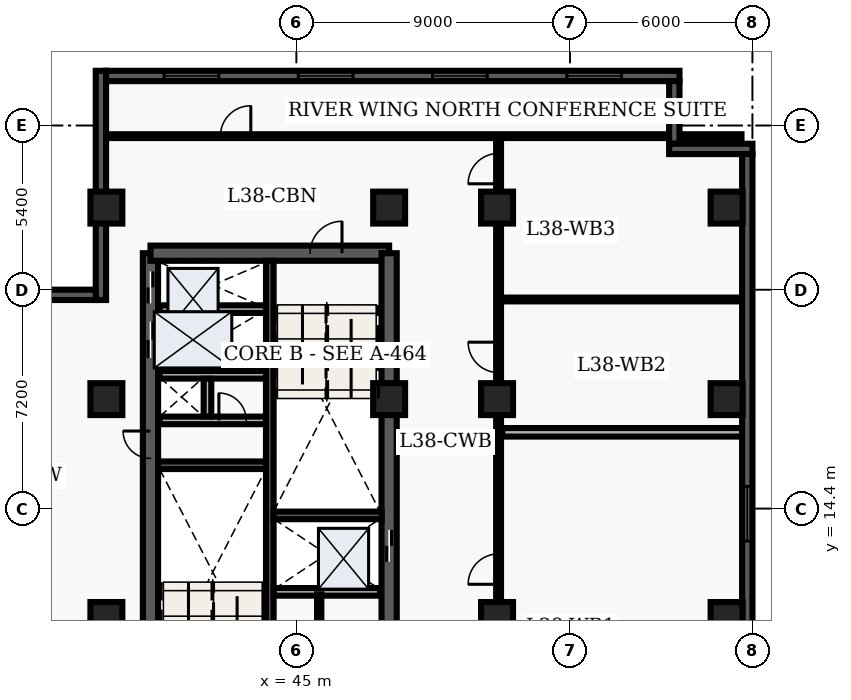
"""IFC4 building model, lengths in metres.
Left out: names, types, materials, properties, quantities, classifications, styles, units other than length and angle.
Written with IfcOpenShell. Run it as: python <this file> out.ifc"""

import sys

from ifc_helpers import new_model, entity, si_unit, converted_unit, direction, frame, origin_with_axes, origin_2d_with_axis, place, context, subcontext, project, spatial, polyline, rectangle, outline, extrude, element, fill, save


model = new_model("IFC4")
c1 = context("Model", 3, precision=1e-05, world=origin_with_axes(), true_north=direction((0.0, 1.0)))
c2 = subcontext(c1, "Body", "Model", "MODEL_VIEW")
j1 = project(units=[si_unit("LENGTHUNIT", "METRE"), converted_unit("PLANEANGLEUNIT", "DEGREE", entity("IfcPlaneAngleMeasure", 0.017), si_unit("PLANEANGLEUNIT", "RADIAN"), dimensions=[0, 0, 0, 0, 0, 0, 0])], contexts=[c1])
p1 = place(None, origin_with_axes())
s1 = spatial("IfcSite", under=j1, at=p1, CompositionType="ELEMENT")
p2 = place(p1, origin_with_axes())
s2 = spatial("IfcBuilding", under=s1, at=p2, CompositionType="ELEMENT")
p3 = place(p2, frame((0.0, 0.0, 156.3), z_axis=(0.0, 0.0, 1.0), x_axis=(1.0, 0.0, 0.0)))
s3 = spatial("IfcBuildingStorey", under=s2, at=p3, CompositionType="ELEMENT", Elevation=156.3)
p4 = place(p3, frame((40.2, 7.2, 0.0), z_axis=(0.0, 0.0, 1.0), x_axis=(0.0, 1.0, 0.0)))
e1 = element("IfcWall", 1, at=p4, inside=s3, PredefinedType="SHEAR", context=c2, shape_type="SweptSolid", body=[
    extrude(outline(polyline([(0.0, -0.25), (15.6, -0.25), (15.6, 0.25), (0.0, 0.25), (0.0, -0.25)])), origin_with_axes(), (0.0, 0.0, 1.0), 3.66),
])
p5 = place(p4, frame((14.475, 0.0, 0.0), z_axis=(0.0, 0.0, 1.0), x_axis=(1.0, 0.0, 0.0)))
e2 = element("IfcOpeningElement", 2, at=p5, cuts=e1, PredefinedType="OPENING", context=c2, shape_type="SweptSolid", body=[
    extrude(rectangle(XDim=1.05, YDim=0.52, at=origin_2d_with_axis()), origin_with_axes(), (0.0, 0.0, 1.0), 2.15),
])
p6 = place(p4, frame((12.75, 0.0, 0.0), z_axis=(0.0, 0.0, 1.0), x_axis=(1.0, 0.0, 0.0)))
e3 = element("IfcOpeningElement", 3, at=p6, cuts=e1, PredefinedType="OPENING", context=c2, shape_type="SweptSolid", body=[
    extrude(rectangle(XDim=1.2, YDim=0.52, at=origin_2d_with_axis()), origin_with_axes(), (0.0, 0.0, 1.0), 2.15),
])
p7 = place(p4, frame((9.3, 0.0, 0.0), z_axis=(0.0, 0.0, 1.0), x_axis=(1.0, 0.0, 0.0)))
e4 = element("IfcOpeningElement", 4, at=p7, cuts=e1, PredefinedType="OPENING", context=c2, shape_type="SweptSolid", body=[
    extrude(rectangle(XDim=0.9, YDim=0.52, at=origin_2d_with_axis()), origin_with_axes(), (0.0, 0.0, 1.0), 2.15),
])
p8 = place(p3, frame((40.2, 22.8, 0.0), z_axis=(0.0, 0.0, 1.0), x_axis=(1.0, 0.0, 0.0)))
e5 = element("IfcWall", 5, at=p8, inside=s3, PredefinedType="SHEAR", context=c2, shape_type="SweptSolid", body=[
    extrude(outline(polyline([(0.0, -0.25), (7.85, -0.25), (7.85, 0.25), (0.0, 0.25), (0.0, -0.25)])), origin_with_axes(), (0.0, 0.0, 1.0), 3.66),
])
p9 = place(p8, frame((5.775, 0.0, 0.0), z_axis=(0.0, 0.0, 1.0), x_axis=(1.0, 0.0, 0.0)))
e6 = element("IfcOpeningElement", 6, at=p9, cuts=e5, PredefinedType="OPENING", context=c2, shape_type="SweptSolid", body=[
    extrude(rectangle(XDim=1.05, YDim=0.52, at=origin_2d_with_axis()), origin_with_axes(), (0.0, 0.0, 1.0), 2.15),
])
p10 = place(p3, frame((48.05, 7.2, 0.0), z_axis=(0.0, 0.0, 1.0), x_axis=(0.0, 1.0, 0.0)))
e7 = element("IfcWall", 7, at=p10, inside=s3, PredefinedType="SHEAR", context=c2, shape_type="SweptSolid", body=[
    extrude(outline(polyline([(0.0, -0.25), (15.6, -0.25), (15.6, 0.25), (0.0, 0.25), (0.0, -0.25)])), origin_with_axes(), (0.0, 0.0, 1.0), 3.66),
])
p11 = place(p10, frame((5.975, 0.0, 0.0), z_axis=(0.0, 0.0, 1.0), x_axis=(1.0, 0.0, 0.0)))
e8 = element("IfcOpeningElement", 8, at=p11, cuts=e7, PredefinedType="OPENING", context=c2, shape_type="SweptSolid", body=[
    extrude(rectangle(XDim=1.05, YDim=0.52, at=origin_2d_with_axis()), origin_with_axes(), (0.0, 0.0, 1.0), 2.15),
])
p12 = place(p10, frame((2.725, 0.0, 0.0), z_axis=(0.0, 0.0, 1.0), x_axis=(1.0, 0.0, 0.0)))
e9 = element("IfcOpeningElement", 9, at=p12, cuts=e7, PredefinedType="OPENING", context=c2, shape_type="SweptSolid", body=[
    extrude(rectangle(XDim=0.95, YDim=0.52, at=origin_2d_with_axis()), origin_with_axes(), (0.0, 0.0, 1.0), 2.15),
])
p13 = place(p3, frame((44.125, 7.45, 0.0), z_axis=(0.0, 0.0, 1.0), x_axis=(0.0, 1.0, 0.0)))
e10 = element("IfcWall", 10, at=p13, inside=s3, PredefinedType="SHEAR", context=c2, shape_type="SweptSolid", body=[
    extrude(outline(polyline([(0.0, -0.125), (15.1, -0.125), (15.1, 0.125), (0.0, 0.125), (0.0, -0.125)])), origin_with_axes(), (0.0, 0.0, 1.0), 3.66),
])
for number, where, z_axis, x_axis in (
    (11, (40.45, 15.825, 0.0), (0.0, 0.0, 1.0), (1.0, 0.0, 0.0)),
    (12, (44.25, 14.175, 0.0), (0.0, 0.0, 1.0), (1.0, 0.0, 0.0)),
):
    element("IfcWall", number, at=place(p3, frame(where, z_axis=z_axis, x_axis=x_axis)), inside=s3, PredefinedType="SHEAR", context=c2, shape_type="SweptSolid", body=[
        extrude(outline(polyline([(0.0, -0.125), (3.55, -0.125), (3.55, 0.125), (0.0, 0.125), (0.0, -0.125)])), origin_with_axes(), (0.0, 0.0, 1.0), 3.66),
    ])
p14 = place(p3, frame((40.5, 17.3, 0.0), z_axis=(0.0, 0.0, 1.0), x_axis=(1.0, 0.0, 0.0)))
e13 = element("IfcWall", 13, at=p14, inside=s3, PredefinedType="SOLIDWALL", context=c2, shape_type="SweptSolid", body=[
    extrude(outline(polyline([(0.0, -0.125), (3.5, -0.125), (3.5, 0.125), (0.0, 0.125), (0.0, -0.125)])), origin_with_axes(), (0.0, 0.0, 1.0), 2.7),
])
p15 = place(p14, frame((2.4, 0.0, 0.0), z_axis=(0.0, 0.0, 1.0), x_axis=(1.0, 0.0, 0.0)))
e14 = element("IfcOpeningElement", 14, at=p15, cuts=e13, PredefinedType="OPENING", context=c2, shape_type="SweptSolid", body=[
    extrude(rectangle(XDim=0.9, YDim=0.27, at=origin_2d_with_axis()), origin_with_axes(), (0.0, 0.0, 1.0), 2.15),
])
p16 = place(p3, frame((40.5, 18.8, 0.0), z_axis=(0.0, 0.0, 1.0), x_axis=(1.0, 0.0, 0.0)))
e15 = element("IfcWall", 15, at=p16, inside=s3, PredefinedType="SOLIDWALL", context=c2, shape_type="SweptSolid", body=[
    extrude(outline(polyline([(0.0, -0.125), (3.5, -0.125), (3.5, 0.125), (0.0, 0.125), (0.0, -0.125)])), origin_with_axes(), (0.0, 0.0, 1.0), 2.7),
])
p17 = place(p3, frame((42.075, 17.43, 0.0), z_axis=(0.0, 0.0, 1.0), x_axis=(0.0, 1.0, 0.0)))
e16 = element("IfcWall", 16, at=p17, inside=s3, PredefinedType="SOLIDWALL", context=c2, shape_type="SweptSolid", body=[
    extrude(outline(polyline([(0.0, -0.125), (1.24, -0.125), (1.24, 0.125), (0.0, 0.125), (0.0, -0.125)])), origin_with_axes(), (0.0, 0.0, 1.0), 2.7),
])
for number, where, z_axis, x_axis in (
    (17, (38.75, 10.8, 0.0), (0.0, 0.0, 1.0), (1.0, 0.0, 0.0)),
    (18, (38.75, 18.0, 0.0), (0.0, 0.0, 1.0), (1.0, 0.0, 0.0)),
    (19, (38.75, 24.3, 0.0), (0.0, 0.0, 1.0), (1.0, 0.0, 0.0)),
    (20, (48.05, 18.0, 0.0), (0.0, 0.0, 1.0), (1.0, 0.0, 0.0)),
    (21, (48.05, 24.3, 0.0), (0.0, 0.0, 1.0), (1.0, 0.0, 0.0)),
    (22, (51.6, 10.8, 0.0), (0.0, 0.0, 1.0), (1.0, 0.0, 0.0)),
    (23, (51.6, 18.0, 0.0), (0.0, 0.0, 1.0), (1.0, 0.0, 0.0)),
    (24, (51.6, 24.3, 0.0), (0.0, 0.0, 1.0), (1.0, 0.0, 0.0)),
    (25, (59.15, 10.8, 0.0), (0.0, 0.0, 1.0), (1.0, 0.0, 0.0)),
    (26, (59.15, 18.0, 0.0), (0.0, 0.0, 1.0), (1.0, 0.0, 0.0)),
    (27, (59.15, 24.3, 0.0), (0.0, 0.0, 1.0), (1.0, 0.0, 0.0)),
):
    element("IfcColumn", number, at=place(p3, frame(where, z_axis=z_axis, x_axis=x_axis)), inside=s3, PredefinedType="COLUMN", context=c2, shape_type="SweptSolid", body=[
        extrude(rectangle(XDim=1.05, YDim=1.05, at=origin_2d_with_axis()), origin_with_axes(), (0.0, 0.0, 1.0), 3.9),
    ])
for number, where, z_axis, x_axis in (
    (28, (40.5, 20.96, 0.0), (0.0, 0.0, 1.0), (1.0, 0.0, 0.0)),
    (29, (44.25, 11.66, 0.0), (0.0, 0.0, 1.0), (1.0, 0.0, 0.0)),
):
    element("IfcWall", number, at=place(p3, frame(where, z_axis=z_axis, x_axis=x_axis)), inside=s3, PredefinedType="SOLIDWALL", context=c2, shape_type="SweptSolid", body=[
        extrude(outline(polyline([(0.0, -0.125), (3.5, -0.125), (3.5, 0.125), (0.0, 0.125), (0.0, -0.125)])), origin_with_axes(), (0.0, 0.0, 1.0), 2.7),
    ])
p18 = place(p3, frame((45.75, 7.5, 0.0), z_axis=(0.0, 0.0, 1.0), x_axis=(0.0, 1.0, 0.0)))
e30 = element("IfcWall", 30, at=p18, inside=s3, PredefinedType="PARTITIONING", context=c2, shape_type="SweptSolid", body=[
    extrude(outline(polyline([(0.0, -0.07), (4.08, -0.07), (4.08, 0.07), (0.0, 0.07), (0.0, -0.07)])), origin_with_axes(), (0.0, 0.0, 1.0), 2.7),
])
p19 = place(p18, frame((2.0, 0.0, 0.0), z_axis=(0.0, 0.0, 1.0), x_axis=(1.0, 0.0, 0.0)))
e31 = element("IfcOpeningElement", 31, at=p19, cuts=e30, PredefinedType="OPENING", context=c2, shape_type="SweptSolid", body=[
    extrude(rectangle(XDim=0.9, YDim=0.16, at=origin_2d_with_axis()), origin_with_axes(), (0.0, 0.0, 1.0), 2.15),
])
p20 = place(p3, frame((51.65, 7.85, 0.0), z_axis=(0.0, 0.0, 1.0), x_axis=(0.0, 1.0, 0.0)))
e32 = element("IfcWall", 32, at=p20, inside=s3, PredefinedType="PARTITIONING", context=c2, shape_type="SweptSolid", body=[
    extrude(outline(polyline([(0.0, -0.08), (18.8, -0.08), (18.8, 0.08), (0.0, 0.08), (0.0, -0.08)])), origin_with_axes(), (0.0, 0.0, 1.0), 2.7),
])
p21 = place(p20, frame((4.559, 0.0, 0.0), z_axis=(0.0, 0.0, 1.0), x_axis=(1.0, 0.0, 0.0)))
e33 = element("IfcOpeningElement", 33, at=p21, cuts=e32, PredefinedType="OPENING", context=c2, shape_type="SweptSolid", body=[
    extrude(rectangle(XDim=1.0, YDim=0.18, at=origin_2d_with_axis()), origin_with_axes(), (0.0, 0.0, 1.0), 2.15),
])
p22 = place(p20, frame((11.523, 0.0, 0.0), z_axis=(0.0, 0.0, 1.0), x_axis=(1.0, 0.0, 0.0)))
e34 = element("IfcOpeningElement", 34, at=p22, cuts=e32, PredefinedType="OPENING", context=c2, shape_type="SweptSolid", body=[
    extrude(rectangle(XDim=1.0, YDim=0.18, at=origin_2d_with_axis()), origin_with_axes(), (0.0, 0.0, 1.0), 2.15),
])
p23 = place(p20, frame((17.733, 0.0, 0.0), z_axis=(0.0, 0.0, 1.0), x_axis=(1.0, 0.0, 0.0)))
e35 = element("IfcOpeningElement", 35, at=p23, cuts=e32, PredefinedType="OPENING", context=c2, shape_type="SweptSolid", body=[
    extrude(rectangle(XDim=1.0, YDim=0.18, at=origin_2d_with_axis()), origin_with_axes(), (0.0, 0.0, 1.0), 2.15),
])
p24 = place(p3, frame((38.735, 26.65, 0.0), z_axis=(0.0, 0.0, 1.0), x_axis=(1.0, 0.0, 0.0)))
e36 = element("IfcWall", 36, at=p24, inside=s3, PredefinedType="PARTITIONING", context=c2, shape_type="SweptSolid", body=[
    extrude(outline(polyline([(0.0, -0.062), (20.905, -0.062), (20.905, 0.062), (0.0, 0.062), (0.0, -0.062)])), origin_with_axes(), (0.0, 0.0, 1.0), 2.7),
])
p25 = place(p24, frame((4.265, 0.0, 0.0), z_axis=(0.0, 0.0, 1.0), x_axis=(1.0, 0.0, 0.0)))
e37 = element("IfcOpeningElement", 37, at=p25, cuts=e36, PredefinedType="OPENING", context=c2, shape_type="SweptSolid", body=[
    extrude(rectangle(XDim=1.0, YDim=0.145, at=origin_2d_with_axis()), origin_with_axes(), (0.0, 0.0, 1.0), 2.15),
])
p26 = place(p3, frame((51.77, 16.908, 0.0), z_axis=(0.0, 0.0, 1.0), x_axis=(1.0, 0.0, 0.0)))
e38 = element("IfcWall", 38, at=p26, inside=s3, PredefinedType="PARTITIONING", context=c2, shape_type="SweptSolid", body=[
    extrude(outline(polyline([(0.0, -0.14), (7.895, -0.14), (7.895, 0.14), (0.0, 0.14), (0.0, -0.14)])), origin_with_axes(), (0.0, 0.0, 1.0), 2.7),
])
p27 = place(p3, frame((51.77, 21.277, 0.0), z_axis=(0.0, 0.0, 1.0), x_axis=(1.0, 0.0, 0.0)))
e39 = element("IfcWall", 39, at=p27, inside=s3, PredefinedType="PARTITIONING", context=c2, shape_type="SweptSolid", body=[
    extrude(outline(polyline([(0.0, -0.062), (7.895, -0.062), (7.895, 0.062), (0.0, 0.062), (0.0, -0.062)])), origin_with_axes(), (0.0, 0.0, 1.0), 2.7),
])
p28 = place(p3, frame((38.57, 21.26, 0.0), z_axis=(0.0, 0.0, 1.0), x_axis=(0.0, 1.0, 0.0)))
e40 = element("IfcWall", 40, at=p28, inside=s3, PredefinedType="SOLIDWALL", context=c2, shape_type="SweptSolid", body=[
    extrude(outline(polyline([(0.0, -0.17), (7.54, -0.17), (7.54, 0.17), (0.0, 0.17), (0.0, -0.17)])), origin_with_axes(), (0.0, 0.0, 1.0), 3.66),
])
p29 = place(p3, frame((38.74, 28.63, 0.0), z_axis=(0.0, 0.0, 1.0), x_axis=(1.0, 0.0, 0.0)))
e41 = element("IfcWall", 41, at=p29, inside=s3, PredefinedType="SOLIDWALL", context=c2, shape_type="SweptSolid", body=[
    extrude(outline(polyline([(0.0, -0.17), (18.86, -0.17), (18.86, 0.17), (0.0, 0.17), (0.0, -0.17)])), origin_with_axes(), (0.0, 0.0, 1.0), 3.66),
])
p30 = place(p29, frame((2.808, 0.0, 0.45), z_axis=(0.0, 0.0, 1.0), x_axis=(1.0, 0.0, 0.0)))
e42 = element("IfcOpeningElement", 42, at=p30, cuts=e41, PredefinedType="OPENING", context=c2, shape_type="SweptSolid", body=[
    extrude(rectangle(XDim=1.8, YDim=0.36, at=origin_2d_with_axis()), origin_with_axes(), (0.0, 0.0, 1.0), 2.1),
])
p31 = place(p29, frame((7.222, 0.0, 0.45), z_axis=(0.0, 0.0, 1.0), x_axis=(1.0, 0.0, 0.0)))
e43 = element("IfcOpeningElement", 43, at=p31, cuts=e41, PredefinedType="OPENING", context=c2, shape_type="SweptSolid", body=[
    extrude(rectangle(XDim=1.8, YDim=0.36, at=origin_2d_with_axis()), origin_with_axes(), (0.0, 0.0, 1.0), 2.1),
])
p32 = place(p29, frame((11.637, 0.0, 0.45), z_axis=(0.0, 0.0, 1.0), x_axis=(1.0, 0.0, 0.0)))
e44 = element("IfcOpeningElement", 44, at=p32, cuts=e41, PredefinedType="OPENING", context=c2, shape_type="SweptSolid", body=[
    extrude(rectangle(XDim=1.8, YDim=0.36, at=origin_2d_with_axis()), origin_with_axes(), (0.0, 0.0, 1.0), 2.1),
])
p33 = place(p29, frame((16.053, 0.0, 0.45), z_axis=(0.0, 0.0, 1.0), x_axis=(1.0, 0.0, 0.0)))
e45 = element("IfcOpeningElement", 45, at=p33, cuts=e41, PredefinedType="OPENING", context=c2, shape_type="SweptSolid", body=[
    extrude(rectangle(XDim=1.8, YDim=0.36, at=origin_2d_with_axis()), origin_with_axes(), (0.0, 0.0, 1.0), 2.1),
])
p34 = place(p3, frame((57.43, 28.46, 0.0), z_axis=(0.0, 0.0, 1.0), x_axis=(0.0, -1.0, 0.0)))
e46 = element("IfcWall", 46, at=p34, inside=s3, PredefinedType="SOLIDWALL", context=c2, shape_type="SweptSolid", body=[
    extrude(outline(polyline([(0.0, -0.17), (2.06, -0.17), (2.06, 0.17), (0.0, 0.17), (0.0, -0.17)])), origin_with_axes(), (0.0, 0.0, 1.0), 3.66),
])
p35 = place(p3, frame((57.26, 26.23, 0.0), z_axis=(0.0, 0.0, 1.0), x_axis=(1.0, 0.0, 0.0)))
e47 = element("IfcWall", 47, at=p35, inside=s3, PredefinedType="SOLIDWALL", context=c2, shape_type="SweptSolid", body=[
    extrude(outline(polyline([(0.0, -0.17), (2.74, -0.17), (2.74, 0.17), (0.0, 0.17), (0.0, -0.17)])), origin_with_axes(), (0.0, 0.0, 1.0), 3.66),
])
p36 = place(p3, frame((59.83, 26.06, 0.0), z_axis=(0.0, 0.0, 1.0), x_axis=(0.0, -1.0, 0.0)))
e48 = element("IfcWall", 48, at=p36, inside=s3, PredefinedType="SOLIDWALL", context=c2, shape_type="SweptSolid", body=[
    extrude(outline(polyline([(0.0, -0.17), (23.66, -0.17), (23.66, 0.17), (0.0, 0.17), (0.0, -0.17)])), origin_with_axes(), (0.0, 0.0, 1.0), 3.66),
])
p37 = place(p36, frame((11.83, 0.0, 0.45), z_axis=(0.0, 0.0, 1.0), x_axis=(1.0, 0.0, 0.0)))
e49 = element("IfcOpeningElement", 49, at=p37, cuts=e48, PredefinedType="OPENING", context=c2, shape_type="SweptSolid", body=[
    extrude(rectangle(XDim=1.8, YDim=0.36, at=origin_2d_with_axis()), origin_with_axes(), (0.0, 0.0, 1.0), 2.1),
])
p38 = place(p36, frame((20.364, 0.0, 0.45), z_axis=(0.0, 0.0, 1.0), x_axis=(1.0, 0.0, 0.0)))
e50 = element("IfcOpeningElement", 50, at=p38, cuts=e48, PredefinedType="OPENING", context=c2, shape_type="SweptSolid", body=[
    extrude(rectangle(XDim=1.8, YDim=0.36, at=origin_2d_with_axis()), origin_with_axes(), (0.0, 0.0, 1.0), 2.1),
])
p39 = place(p3, frame((22.712, 21.43, 0.0), z_axis=(0.0, 0.0, 1.0), x_axis=(1.0, 0.0, 0.0)))
e51 = element("IfcWall", 51, at=p39, inside=s3, PredefinedType="SOLIDWALL", context=c2, shape_type="SweptSolid", body=[
    extrude(outline(polyline([(0.0, -0.17), (15.688, -0.17), (15.688, 0.17), (0.0, 0.17), (0.0, -0.17)])), origin_with_axes(), (0.0, 0.0, 1.0), 3.66),
])
p40 = place(p39, frame((3.015, 0.0, 0.45), z_axis=(0.0, 0.0, 1.0), x_axis=(1.0, 0.0, 0.0)))
e52 = element("IfcOpeningElement", 52, at=p40, cuts=e51, PredefinedType="OPENING", context=c2, shape_type="SweptSolid", body=[
    extrude(rectangle(XDim=1.8, YDim=0.36, at=origin_2d_with_axis()), origin_with_axes(), (0.0, 0.0, 1.0), 2.1),
])
p41 = place(p39, frame((7.844, 0.0, 0.45), z_axis=(0.0, 0.0, 1.0), x_axis=(1.0, 0.0, 0.0)))
e53 = element("IfcOpeningElement", 53, at=p41, cuts=e51, PredefinedType="OPENING", context=c2, shape_type="SweptSolid", body=[
    extrude(rectangle(XDim=1.8, YDim=0.36, at=origin_2d_with_axis()), origin_with_axes(), (0.0, 0.0, 1.0), 2.1),
])
p42 = place(p39, frame((12.223, 0.0, 0.45), z_axis=(0.0, 0.0, 1.0), x_axis=(1.0, 0.0, 0.0)))
e54 = element("IfcOpeningElement", 54, at=p42, cuts=e51, PredefinedType="OPENING", context=c2, shape_type="SweptSolid", body=[
    extrude(rectangle(XDim=1.8, YDim=0.36, at=origin_2d_with_axis()), origin_with_axes(), (0.0, 0.0, 1.0), 2.1),
])
p43 = place(p10, frame((5.975, 0.0, 0.0), z_axis=(0.0, 0.0, 1.0), x_axis=(1.0, 0.0, 0.0)))
e55 = element("IfcDoor", 55, at=p43, inside=s3, OperationType="SLIDING_TO_LEFT", PredefinedType="DOOR", context=c2, shape_type="SweptSolid", body=[
    extrude(rectangle(XDim=1.05, YDim=0.09, at=origin_2d_with_axis()), origin_with_axes(), (0.0, 0.0, 1.0), 2.15),
])
fill(e8, e55)
p44 = place(p4, frame((14.475, 0.0, 0.0), z_axis=(0.0, 0.0, 1.0), x_axis=(1.0, 0.0, 0.0)))
e56 = element("IfcDoor", 56, at=p44, inside=s3, OperationType="SLIDING_TO_RIGHT", PredefinedType="DOOR", context=c2, shape_type="SweptSolid", body=[
    extrude(rectangle(XDim=1.05, YDim=0.09, at=origin_2d_with_axis()), origin_with_axes(), (0.0, 0.0, 1.0), 2.15),
])
fill(e2, e56)
p45 = place(p4, frame((12.75, 0.0, 0.0), z_axis=(0.0, 0.0, 1.0), x_axis=(1.0, 0.0, 0.0)))
e57 = element("IfcDoor", 57, at=p45, inside=s3, OperationType="DOUBLE_DOOR_SLIDING", PredefinedType="DOOR", context=c2, shape_type="SweptSolid", body=[
    extrude(rectangle(XDim=1.2, YDim=0.09, at=origin_2d_with_axis()), origin_with_axes(), (0.0, 0.0, 1.0), 2.15),
])
fill(e3, e57)
p46 = place(p4, frame((9.3, 0.0, 0.0), z_axis=(0.0, 0.0, 1.0), x_axis=(1.0, 0.0, 0.0)))
e58 = element("IfcDoor", 58, at=p46, inside=s3, OperationType="SINGLE_SWING_RIGHT", PredefinedType="DOOR", context=c2, shape_type="SweptSolid", body=[
    extrude(rectangle(XDim=0.9, YDim=0.09, at=origin_2d_with_axis()), origin_with_axes(), (0.0, 0.0, 1.0), 2.15),
])
fill(e4, e58)
p47 = place(p14, frame((2.4, 0.0, 0.0), z_axis=(0.0, 0.0, 1.0), x_axis=(1.0, 0.0, 0.0)))
e59 = element("IfcDoor", 59, at=p47, inside=s3, OperationType="SINGLE_SWING_LEFT", PredefinedType="DOOR", context=c2, shape_type="SweptSolid", body=[
    extrude(rectangle(XDim=0.9, YDim=0.09, at=origin_2d_with_axis()), origin_with_axes(), (0.0, 0.0, 1.0), 2.15),
])
fill(e14, e59)
p48 = place(p8, frame((5.775, 0.0, 0.0), z_axis=(0.0, 0.0, 1.0), x_axis=(1.0, 0.0, 0.0)))
e60 = element("IfcDoor", 60, at=p48, inside=s3, OperationType="SINGLE_SWING_RIGHT", PredefinedType="DOOR", context=c2, shape_type="SweptSolid", body=[
    extrude(rectangle(XDim=1.05, YDim=0.09, at=origin_2d_with_axis()), origin_with_axes(), (0.0, 0.0, 1.0), 2.15),
])
fill(e6, e60)
p49 = place(p24, frame((4.265, 0.0, 0.0), z_axis=(0.0, 0.0, 1.0), x_axis=(1.0, 0.0, 0.0)))
e61 = element("IfcDoor", 61, at=p49, inside=s3, OperationType="SINGLE_SWING_RIGHT", PredefinedType="DOOR", context=c2, shape_type="SweptSolid", body=[
    extrude(rectangle(XDim=1.0, YDim=0.075, at=origin_2d_with_axis()), origin_with_axes(), (0.0, 0.0, 1.0), 2.15),
])
fill(e37, e61)
p50 = place(p20, frame((4.559, 0.0, 0.0), z_axis=(0.0, 0.0, 1.0), x_axis=(1.0, 0.0, 0.0)))
e62 = element("IfcDoor", 62, at=p50, inside=s3, OperationType="SINGLE_SWING_LEFT", PredefinedType="DOOR", context=c2, shape_type="SweptSolid", body=[
    extrude(rectangle(XDim=1.0, YDim=0.09, at=origin_2d_with_axis()), origin_with_axes(), (0.0, 0.0, 1.0), 2.15),
])
fill(e33, e62)
p51 = place(p20, frame((11.523, 0.0, 0.0), z_axis=(0.0, 0.0, 1.0), x_axis=(1.0, 0.0, 0.0)))
e63 = element("IfcDoor", 63, at=p51, inside=s3, OperationType="SINGLE_SWING_RIGHT", PredefinedType="DOOR", context=c2, shape_type="SweptSolid", body=[
    extrude(rectangle(XDim=1.0, YDim=0.09, at=origin_2d_with_axis()), origin_with_axes(), (0.0, 0.0, 1.0), 2.15),
])
fill(e34, e63)
p52 = place(p20, frame((17.733, 0.0, 0.0), z_axis=(0.0, 0.0, 1.0), x_axis=(1.0, 0.0, 0.0)))
e64 = element("IfcDoor", 64, at=p52, inside=s3, OperationType="SINGLE_SWING_LEFT", PredefinedType="DOOR", context=c2, shape_type="SweptSolid", body=[
    extrude(rectangle(XDim=1.0, YDim=0.09, at=origin_2d_with_axis()), origin_with_axes(), (0.0, 0.0, 1.0), 2.15),
])
fill(e35, e64)
p53 = place(p29, frame((2.808, 0.0, 0.45), z_axis=(0.0, 0.0, 1.0), x_axis=(1.0, 0.0, 0.0)))
e65 = element("IfcWindow", 65, at=p53, inside=s3, PredefinedType="WINDOW", context=c2, shape_type="SweptSolid", body=[
    extrude(rectangle(XDim=1.8, YDim=0.09, at=origin_2d_with_axis()), origin_with_axes(), (0.0, 0.0, 1.0), 2.1),
])
fill(e42, e65)
p54 = place(p29, frame((7.222, 0.0, 0.45), z_axis=(0.0, 0.0, 1.0), x_axis=(1.0, 0.0, 0.0)))
e66 = element("IfcWindow", 66, at=p54, inside=s3, PredefinedType="WINDOW", context=c2, shape_type="SweptSolid", body=[
    extrude(rectangle(XDim=1.8, YDim=0.09, at=origin_2d_with_axis()), origin_with_axes(), (0.0, 0.0, 1.0), 2.1),
])
fill(e43, e66)
p55 = place(p29, frame((11.637, 0.0, 0.45), z_axis=(0.0, 0.0, 1.0), x_axis=(1.0, 0.0, 0.0)))
e67 = element("IfcWindow", 67, at=p55, inside=s3, PredefinedType="WINDOW", context=c2, shape_type="SweptSolid", body=[
    extrude(rectangle(XDim=1.8, YDim=0.09, at=origin_2d_with_axis()), origin_with_axes(), (0.0, 0.0, 1.0), 2.1),
])
fill(e44, e67)
p56 = place(p29, frame((16.053, 0.0, 0.45), z_axis=(0.0, 0.0, 1.0), x_axis=(1.0, 0.0, 0.0)))
e68 = element("IfcWindow", 68, at=p56, inside=s3, PredefinedType="WINDOW", context=c2, shape_type="SweptSolid", body=[
    extrude(rectangle(XDim=1.8, YDim=0.09, at=origin_2d_with_axis()), origin_with_axes(), (0.0, 0.0, 1.0), 2.1),
])
fill(e45, e68)
p57 = place(p36, frame((11.83, 0.0, 0.45), z_axis=(0.0, 0.0, 1.0), x_axis=(1.0, 0.0, 0.0)))
e69 = element("IfcWindow", 69, at=p57, inside=s3, PredefinedType="WINDOW", context=c2, shape_type="SweptSolid", body=[
    extrude(rectangle(XDim=1.8, YDim=0.09, at=origin_2d_with_axis()), origin_with_axes(), (0.0, 0.0, 1.0), 2.1),
])
fill(e49, e69)
save(model, sys.argv[1])
